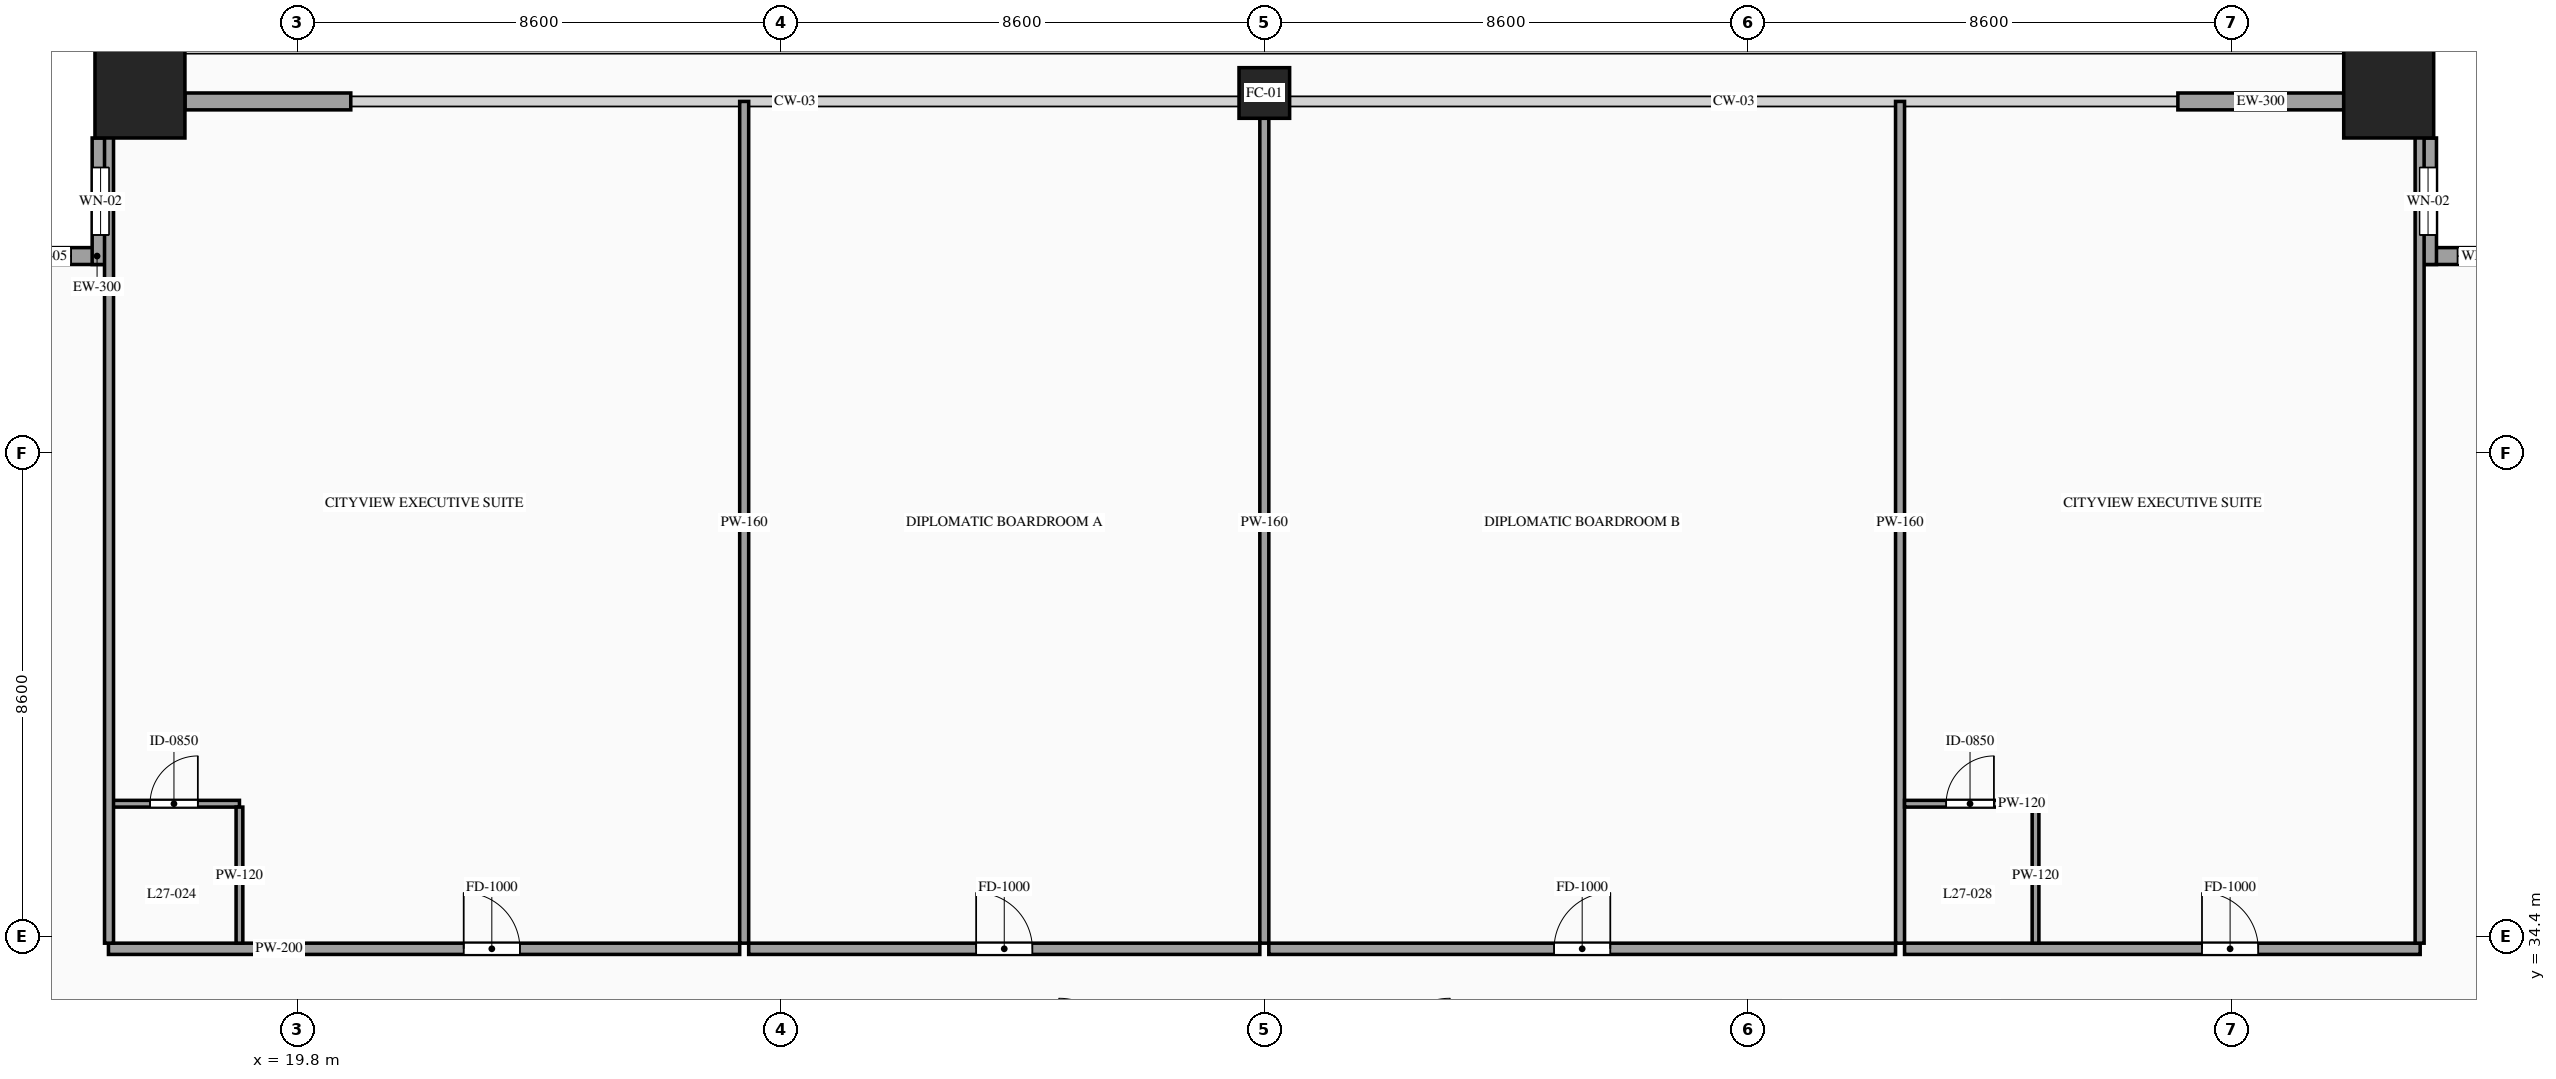
"""IFC4 building model, lengths in metres.
Left out: names, types, materials, properties, quantities, classifications, styles, units other than length and angle.
Written with IfcOpenShell. Run it as: python <this file> out.ifc"""

import sys

from ifc_helpers import new_model, si_unit, direction, frame, frame_2d, origin, origin_2d, place, context, subcontext, project, spatial, rectangle, hollow_rectangle, extrude, source, transform, mapped, element, fill, save


model = new_model("IFC4")
c1 = context("Model", 3, precision=1e-05, world=origin(), true_north=direction((0.0, 1.0)))
c2 = subcontext(c1, "Body", "Model", "MODEL_VIEW")
j1 = project(units=[si_unit("LENGTHUNIT", "METRE"), si_unit("PLANEANGLEUNIT", "RADIAN")], contexts=[c1])
p1 = place(None, origin())
s1 = spatial("IfcSite", under=j1, at=p1, CompositionType="ELEMENT")
p2 = place(p1, origin())
s2 = spatial("IfcBuilding", under=s1, at=p2, CompositionType="ELEMENT")
p3 = place(p2, frame((0.0, 0.0, 104.6)))
s3 = spatial("IfcBuildingStorey", under=s2, at=p3, CompositionType="ELEMENT", Elevation=104.6)
m1 = source(origin(), c2, "Body", "SweptSolid", [
    extrude(hollow_rectangle(XDim=1.6, YDim=1.6, WallThickness=0.07, at=origin_2d()), origin(), (0.0, 0.0, 1.0), 3.6),
])
p4 = place(p3, frame((17.0, 49.4, 0.0), z_axis=(0.0, 0.0, 1.0), x_axis=(1.0, 0.0, 0.0)))
e1 = element("IfcColumn", 1, at=p4, inside=s3, PredefinedType="COLUMN", context=c2, shape_type="MappedRepresentation", body=[
    mapped(m1, transform((0.0, 0.0, 0.0), scale=1.0)),
])
m2 = source(origin(), c2, "Body", "SweptSolid", [
    extrude(hollow_rectangle(XDim=0.9, YDim=0.9, WallThickness=0.042, at=origin_2d()), origin(), (0.0, 0.0, 1.0), 3.6),
])
p5 = place(p3, frame((37.0, 49.4, 0.0), z_axis=(0.0, 0.0, 1.0), x_axis=(1.0, 0.0, 0.0)))
e2 = element("IfcColumn", 2, at=p5, inside=s3, PredefinedType="COLUMN", context=c2, shape_type="MappedRepresentation", body=[
    mapped(m2, transform((0.0, 0.0, 0.0), scale=1.0)),
])
p6 = place(p3, frame((57.0, 49.4, 0.0), z_axis=(0.0, 0.0, 1.0), x_axis=(1.0, 0.0, 0.0)))
e3 = element("IfcColumn", 3, at=p6, inside=s3, PredefinedType="COLUMN", context=c2, shape_type="MappedRepresentation", body=[
    mapped(m1, transform((0.0, 0.0, 0.0), scale=1.0)),
])
p7 = place(p3, frame((16.45, 46.5, 0.0), z_axis=(0.0, 0.0, 1.0), x_axis=(-1.0, 0.0, 0.0)))
e4 = element("IfcWall", 4, at=p7, inside=s3, PredefinedType="SOLIDWALL", context=c2, shape_type="SweptSolid", body=[
    extrude(rectangle(XDim=2.25, YDim=0.3, at=frame_2d((1.125, 0.0))), origin(), (0.0, 0.0, 1.0), 3.38),
])
p8 = place(p7, frame((0.675, 0.0, 0.85)))
e5 = element("IfcOpeningElement", 5, at=p8, cuts=e4, PredefinedType="OPENING", context=c2, shape_type="SweptSolid", body=[
    extrude(rectangle(XDim=0.9, YDim=1.5, at=frame_2d((0.45, 0.75))), frame((0.0, 0.165, 0.0), z_axis=(0.0, -1.0, 0.0), x_axis=(1.0, 0.0, 0.0)), (0.0, 0.0, 1.0), 0.33),
])
p9 = place(p3, frame((16.3, 48.6, 0.0), z_axis=(0.0, 0.0, 1.0), x_axis=(0.0, -1.0, 0.0)))
e6 = element("IfcWall", 6, at=p9, inside=s3, PredefinedType="SOLIDWALL", context=c2, shape_type="SweptSolid", body=[
    extrude(rectangle(XDim=2.25, YDim=0.3, at=frame_2d((1.125, 0.0))), origin(), (0.0, 0.0, 1.0), 3.38),
])
p10 = place(p9, frame((0.525, 0.0, 0.85)))
e7 = element("IfcOpeningElement", 7, at=p10, cuts=e6, PredefinedType="OPENING", context=c2, shape_type="SweptSolid", body=[
    extrude(rectangle(XDim=1.2, YDim=2.1, at=frame_2d((0.6, 1.05))), frame((0.0, 0.165, 0.0), z_axis=(0.0, -1.0, 0.0), x_axis=(1.0, 0.0, 0.0)), (0.0, 0.0, 1.0), 0.33),
])
p11 = place(p3, frame((59.8, 46.5, 0.0), z_axis=(0.0, 0.0, 1.0), x_axis=(-1.0, 0.0, 0.0)))
e8 = element("IfcWall", 8, at=p11, inside=s3, PredefinedType="SOLIDWALL", context=c2, shape_type="SweptSolid", body=[
    extrude(rectangle(XDim=2.25, YDim=0.3, at=frame_2d((1.125, 0.0))), origin(), (0.0, 0.0, 1.0), 3.38),
])
p12 = place(p11, frame((0.675, 0.0, 0.85)))
e9 = element("IfcOpeningElement", 9, at=p12, cuts=e8, PredefinedType="OPENING", context=c2, shape_type="SweptSolid", body=[
    extrude(rectangle(XDim=0.9, YDim=1.5, at=frame_2d((0.45, 0.75))), frame((0.0, 0.165, 0.0), z_axis=(0.0, -1.0, 0.0), x_axis=(1.0, 0.0, 0.0)), (0.0, 0.0, 1.0), 0.33),
])
p13 = place(p3, frame((57.7, 46.35, 0.0), z_axis=(0.0, 0.0, 1.0), x_axis=(0.0, 1.0, 0.0)))
e10 = element("IfcWall", 10, at=p13, inside=s3, PredefinedType="SOLIDWALL", context=c2, shape_type="SweptSolid", body=[
    extrude(rectangle(XDim=2.25, YDim=0.3, at=frame_2d((1.125, 0.0))), origin(), (0.0, 0.0, 1.0), 3.38),
])
p14 = place(p13, frame((0.525, 0.0, 0.85)))
e11 = element("IfcOpeningElement", 11, at=p14, cuts=e10, PredefinedType="OPENING", context=c2, shape_type="SweptSolid", body=[
    extrude(rectangle(XDim=1.2, YDim=2.1, at=frame_2d((0.6, 1.05))), frame((0.0, 0.165, 0.0), z_axis=(0.0, -1.0, 0.0), x_axis=(1.0, 0.0, 0.0)), (0.0, 0.0, 1.0), 0.33),
])
m3 = source(origin(), c2, "Body", "SweptSolid", [
    extrude(rectangle(XDim=2.95, YDim=0.3, at=frame_2d((1.475, 0.0))), origin(), (0.0, 0.0, 1.0), 2.775),
])
for number, where, z_axis, x_axis in (
    (12, (17.8, 49.25, 0.0), (0.0, 0.0, 1.0), (1.0, 0.0, 0.0)),
    (13, (53.25, 49.25, 0.0), (0.0, 0.0, 1.0), (1.0, 0.0, 0.0)),
):
    element("IfcWall", number, at=place(p3, frame(where, z_axis=z_axis, x_axis=x_axis)), inside=s3, PredefinedType="SOLIDWALL", context=c2, shape_type="MappedRepresentation", body=[
        mapped(m3, transform((0.0, 0.0, 0.0), scale=1.0)),
    ])
p15 = place(p3, frame((16.44, 34.18, 0.0), z_axis=(0.0, 0.0, 1.0), x_axis=(1.0, 0.0, 0.0)))
e14 = element("IfcWall", 14, at=p15, inside=s3, PredefinedType="PARTITIONING", context=c2, shape_type="SweptSolid", body=[
    extrude(rectangle(XDim=11.228, YDim=0.2, at=frame_2d((5.614, 0.0))), origin(), (0.0, 0.0, 1.0), 3.38),
])
p16 = place(p15, frame((6.319, 0.0, 0.0)))
e15 = element("IfcOpeningElement", 15, at=p16, cuts=e14, PredefinedType="OPENING", context=c2, shape_type="SweptSolid", body=[
    extrude(rectangle(XDim=1.0, YDim=2.2, at=frame_2d((0.5, 1.1))), frame((0.0, 0.115, 0.0), z_axis=(0.0, -1.0, 0.0), x_axis=(1.0, 0.0, 0.0)), (0.0, 0.0, 1.0), 0.23),
])
m4 = source(origin(), c2, "Body", "SweptSolid", [
    extrude(rectangle(XDim=14.97, YDim=0.16, at=frame_2d((7.485, 0.0))), origin(), (0.0, 0.0, 1.0), 3.38),
])
p17 = place(p3, frame((27.748, 34.28, 0.0), z_axis=(0.0, 0.0, 1.0), x_axis=(0.0, 1.0, 0.0)))
e16 = element("IfcWall", 16, at=p17, inside=s3, PredefinedType="PARTITIONING", context=c2, shape_type="MappedRepresentation", body=[
    mapped(m4, transform((0.0, 0.0, 0.0), scale=1.0)),
])
p18 = place(p3, frame((16.44, 36.76, 0.0), z_axis=(0.0, 0.0, 1.0), x_axis=(1.0, 0.0, 0.0)))
e17 = element("IfcWall", 17, at=p18, inside=s3, PredefinedType="PARTITIONING", context=c2, shape_type="SweptSolid", body=[
    extrude(rectangle(XDim=2.33, YDim=0.12, at=frame_2d((1.165, 0.0))), origin(), (0.0, 0.0, 1.0), 3.38),
])
p19 = place(p18, frame((0.74, 0.0, 0.0)))
e18 = element("IfcOpeningElement", 18, at=p19, cuts=e17, PredefinedType="OPENING", context=c2, shape_type="SweptSolid", body=[
    extrude(rectangle(XDim=0.85, YDim=2.1, at=frame_2d((0.425, 1.05))), frame((0.0, 0.075, 0.0), z_axis=(0.0, -1.0, 0.0), x_axis=(1.0, 0.0, 0.0)), (0.0, 0.0, 1.0), 0.15),
])
m5 = source(origin(), c2, "Body", "SweptSolid", [
    extrude(rectangle(XDim=2.42, YDim=0.12, at=frame_2d((1.21, 0.0))), origin(), (0.0, 0.0, 1.0), 3.38),
])
p20 = place(p3, frame((18.77, 34.28, 0.0), z_axis=(0.0, 0.0, 1.0), x_axis=(0.0, 1.0, 0.0)))
e19 = element("IfcWall", 19, at=p20, inside=s3, PredefinedType="PARTITIONING", context=c2, shape_type="MappedRepresentation", body=[
    mapped(m5, transform((0.0, 0.0, 0.0), scale=1.0)),
])
p21 = place(p3, frame((27.828, 34.18, 0.0), z_axis=(0.0, 0.0, 1.0), x_axis=(1.0, 0.0, 0.0)))
e20 = element("IfcWall", 20, at=p21, inside=s3, PredefinedType="PARTITIONING", context=c2, shape_type="SweptSolid", body=[
    extrude(rectangle(XDim=9.092, YDim=0.2, at=frame_2d((4.546, 0.0))), origin(), (0.0, 0.0, 1.0), 3.38),
])
p22 = place(p21, frame((4.046, 0.0, 0.0)))
e21 = element("IfcOpeningElement", 21, at=p22, cuts=e20, PredefinedType="OPENING", context=c2, shape_type="SweptSolid", body=[
    extrude(rectangle(XDim=1.0, YDim=2.2, at=frame_2d((0.5, 1.1))), frame((0.0, 0.115, 0.0), z_axis=(0.0, -1.0, 0.0), x_axis=(1.0, 0.0, 0.0)), (0.0, 0.0, 1.0), 0.23),
])
m6 = source(origin(), c2, "Body", "SweptSolid", [
    extrude(rectangle(XDim=14.97, YDim=0.16, at=frame_2d((7.485, 0.0))), origin(), (0.0, 0.0, 1.0), 2.675),
])
p23 = place(p3, frame((37.0, 34.28, 0.0), z_axis=(0.0, 0.0, 1.0), x_axis=(0.0, 1.0, 0.0)))
e22 = element("IfcWall", 22, at=p23, inside=s3, PredefinedType="PARTITIONING", context=c2, shape_type="MappedRepresentation", body=[
    mapped(m6, transform((0.0, 0.0, 0.0), scale=1.0)),
])
p24 = place(p3, frame((37.08, 34.18, 0.0), z_axis=(0.0, 0.0, 1.0), x_axis=(1.0, 0.0, 0.0)))
e23 = element("IfcWall", 23, at=p24, inside=s3, PredefinedType="PARTITIONING", context=c2, shape_type="SweptSolid", body=[
    extrude(rectangle(XDim=11.148, YDim=0.2, at=frame_2d((5.574, 0.0))), origin(), (0.0, 0.0, 1.0), 3.38),
])
p25 = place(p24, frame((5.074, 0.0, 0.0)))
e24 = element("IfcOpeningElement", 24, at=p25, cuts=e23, PredefinedType="OPENING", context=c2, shape_type="SweptSolid", body=[
    extrude(rectangle(XDim=1.0, YDim=2.2, at=frame_2d((0.5, 1.1))), frame((0.0, 0.115, 0.0), z_axis=(0.0, -1.0, 0.0), x_axis=(1.0, 0.0, 0.0)), (0.0, 0.0, 1.0), 0.23),
])
p26 = place(p3, frame((48.308, 34.28, 0.0), z_axis=(0.0, 0.0, 1.0), x_axis=(0.0, 1.0, 0.0)))
e25 = element("IfcWall", 25, at=p26, inside=s3, PredefinedType="PARTITIONING", context=c2, shape_type="MappedRepresentation", body=[
    mapped(m4, transform((0.0, 0.0, 0.0), scale=1.0)),
])
p27 = place(p3, frame((48.388, 34.18, 0.0), z_axis=(0.0, 0.0, 1.0), x_axis=(1.0, 0.0, 0.0)))
e26 = element("IfcWall", 26, at=p27, inside=s3, PredefinedType="PARTITIONING", context=c2, shape_type="SweptSolid", body=[
    extrude(rectangle(XDim=9.172, YDim=0.2, at=frame_2d((4.586, 0.0))), origin(), (0.0, 0.0, 1.0), 3.38),
])
p28 = place(p27, frame((5.291, 0.0, 0.0)))
e27 = element("IfcOpeningElement", 27, at=p28, cuts=e26, PredefinedType="OPENING", context=c2, shape_type="SweptSolid", body=[
    extrude(rectangle(XDim=1.0, YDim=2.2, at=frame_2d((0.5, 1.1))), frame((0.0, 0.115, 0.0), z_axis=(0.0, -1.0, 0.0), x_axis=(1.0, 0.0, 0.0)), (0.0, 0.0, 1.0), 0.23),
])
m7 = source(origin(), c2, "Body", "SweptSolid", [
    extrude(rectangle(XDim=14.82, YDim=0.16, at=frame_2d((7.41, 0.0))), origin(), (0.0, 0.0, 1.0), 3.38),
])
for number, where, z_axis, x_axis in (
    (28, (16.45, 34.28, 0.0), (0.0, 0.0, 1.0), (0.0, 1.0, 0.0)),
    (29, (57.55, 34.28, 0.0), (0.0, 0.0, 1.0), (0.0, 1.0, 0.0)),
):
    element("IfcWall", number, at=place(p3, frame(where, z_axis=z_axis, x_axis=x_axis)), inside=s3, PredefinedType="PARTITIONING", context=c2, shape_type="MappedRepresentation", body=[
        mapped(m7, transform((0.0, 0.0, 0.0), scale=1.0)),
    ])
p29 = place(p3, frame((48.388, 36.76, 0.0), z_axis=(0.0, 0.0, 1.0), x_axis=(1.0, 0.0, 0.0)))
e30 = element("IfcWall", 30, at=p29, inside=s3, PredefinedType="PARTITIONING", context=c2, shape_type="SweptSolid", body=[
    extrude(rectangle(XDim=2.33, YDim=0.12, at=frame_2d((1.165, 0.0))), origin(), (0.0, 0.0, 1.0), 3.38),
])
p30 = place(p29, frame((0.74, 0.0, 0.0)))
e31 = element("IfcOpeningElement", 31, at=p30, cuts=e30, PredefinedType="OPENING", context=c2, shape_type="SweptSolid", body=[
    extrude(rectangle(XDim=0.85, YDim=2.1, at=frame_2d((0.425, 1.05))), frame((0.0, 0.075, 0.0), z_axis=(0.0, -1.0, 0.0), x_axis=(1.0, 0.0, 0.0)), (0.0, 0.0, 1.0), 0.15),
])
p31 = place(p3, frame((50.718, 34.28, 0.0), z_axis=(0.0, 0.0, 1.0), x_axis=(0.0, 1.0, 0.0)))
e32 = element("IfcWall", 32, at=p31, inside=s3, PredefinedType="PARTITIONING", context=c2, shape_type="MappedRepresentation", body=[
    mapped(m5, transform((0.0, 0.0, 0.0), scale=1.0)),
])
m8 = source(origin(), c2, "Body", "SweptSolid", [
    extrude(rectangle(XDim=0.9, YDim=1.5, at=frame_2d((0.45, 0.75))), frame((0.0, 0.03, 0.0), z_axis=(0.0, -1.0, 0.0), x_axis=(1.0, 0.0, 0.0)), (0.0, 0.0, 1.0), 0.06),
])
p32 = place(p8, origin())
e33 = element("IfcWindow", 33, at=p32, inside=s3, PartitioningType="SINGLE_PANEL", PredefinedType="WINDOW", context=c2, shape_type="MappedRepresentation", body=[
    mapped(m8, transform((0.0, 0.0, 0.0), scale=1.0)),
])
fill(e5, e33)
m9 = source(origin(), c2, "Body", "SweptSolid", [
    extrude(rectangle(XDim=1.2, YDim=2.1, at=frame_2d((0.6, 1.05))), frame((0.0, 0.03, 0.0), z_axis=(0.0, -1.0, 0.0), x_axis=(1.0, 0.0, 0.0)), (0.0, 0.0, 1.0), 0.06),
])
p33 = place(p10, origin())
e34 = element("IfcWindow", 34, at=p33, inside=s3, PartitioningType="SINGLE_PANEL", PredefinedType="WINDOW", context=c2, shape_type="MappedRepresentation", body=[
    mapped(m9, transform((0.0, 0.0, 0.0), scale=1.0)),
])
fill(e7, e34)
p34 = place(p12, origin())
e35 = element("IfcWindow", 35, at=p34, inside=s3, PartitioningType="SINGLE_PANEL", PredefinedType="WINDOW", context=c2, shape_type="MappedRepresentation", body=[
    mapped(m8, transform((0.0, 0.0, 0.0), scale=1.0)),
])
fill(e9, e35)
p35 = place(p14, origin())
e36 = element("IfcWindow", 36, at=p35, inside=s3, PartitioningType="SINGLE_PANEL", PredefinedType="WINDOW", context=c2, shape_type="MappedRepresentation", body=[
    mapped(m9, transform((0.0, 0.0, 0.0), scale=1.0)),
])
fill(e11, e36)
m10 = source(origin(), c2, "Body", "SweptSolid", [
    extrude(rectangle(XDim=1.0, YDim=2.2, at=frame_2d((0.5, 1.1))), frame((0.0, 0.025, 0.0), z_axis=(0.0, -1.0, 0.0), x_axis=(1.0, 0.0, 0.0)), (0.0, 0.0, 1.0), 0.05),
])
p36 = place(p16, origin())
e37 = element("IfcDoor", 37, at=p36, inside=s3, OperationType="SINGLE_SWING_LEFT", PredefinedType="DOOR", context=c2, shape_type="MappedRepresentation", body=[
    mapped(m10, transform((0.0, 0.0, 0.0), scale=1.0)),
])
fill(e15, e37)
m11 = source(origin(), c2, "Body", "SweptSolid", [
    extrude(rectangle(XDim=0.85, YDim=2.1, at=frame_2d((0.425, 1.05))), frame((0.0, 0.025, 0.0), z_axis=(0.0, -1.0, 0.0), x_axis=(1.0, 0.0, 0.0)), (0.0, 0.0, 1.0), 0.05),
])
p37 = place(p19, origin())
e38 = element("IfcDoor", 38, at=p37, inside=s3, OperationType="SINGLE_SWING_RIGHT", PredefinedType="DOOR", context=c2, shape_type="MappedRepresentation", body=[
    mapped(m11, transform((0.0, 0.0, 0.0), scale=1.0)),
])
fill(e18, e38)
p38 = place(p22, origin())
e39 = element("IfcDoor", 39, at=p38, inside=s3, OperationType="SINGLE_SWING_LEFT", PredefinedType="DOOR", context=c2, shape_type="MappedRepresentation", body=[
    mapped(m10, transform((0.0, 0.0, 0.0), scale=1.0)),
])
fill(e21, e39)
p39 = place(p25, origin())
e40 = element("IfcDoor", 40, at=p39, inside=s3, OperationType="SINGLE_SWING_RIGHT", PredefinedType="DOOR", context=c2, shape_type="MappedRepresentation", body=[
    mapped(m10, transform((0.0, 0.0, 0.0), scale=1.0)),
])
fill(e24, e40)
p40 = place(p28, origin())
e41 = element("IfcDoor", 41, at=p40, inside=s3, OperationType="SINGLE_SWING_LEFT", PredefinedType="DOOR", context=c2, shape_type="MappedRepresentation", body=[
    mapped(m10, transform((0.0, 0.0, 0.0), scale=1.0)),
])
fill(e27, e41)
p41 = place(p30, origin())
e42 = element("IfcDoor", 42, at=p41, inside=s3, OperationType="SINGLE_SWING_RIGHT", PredefinedType="DOOR", context=c2, shape_type="MappedRepresentation", body=[
    mapped(m11, transform((0.0, 0.0, 0.0), scale=1.0)),
])
fill(e31, e42)
save(model, sys.argv[1])
